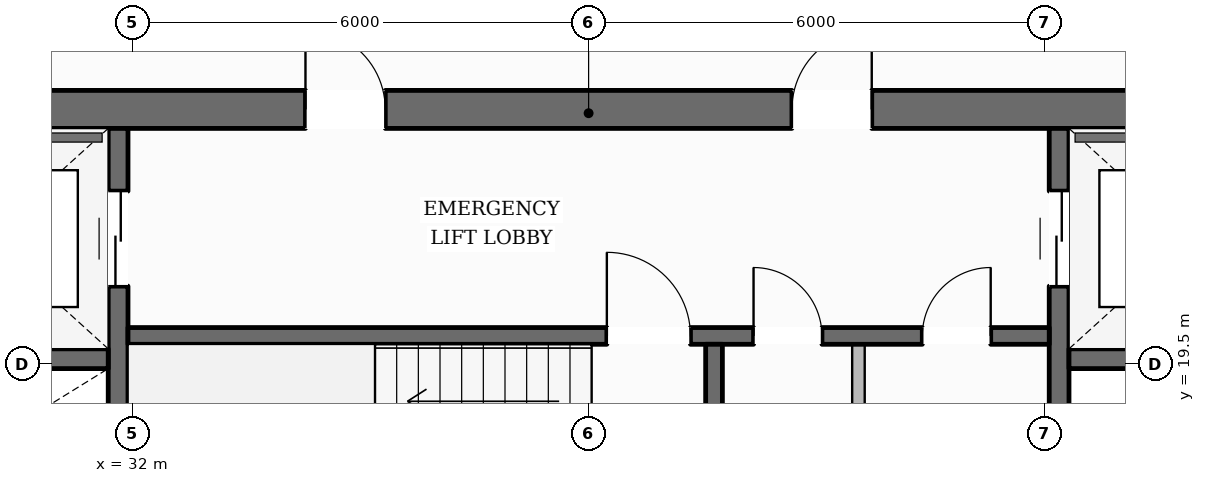
"""IFC4 building model, lengths in metres.
Left out: names, types, materials, properties, quantities, classifications, styles, units other than length and angle.
Written with IfcOpenShell. Run it as: python <this file> out.ifc"""

import sys

from ifc_helpers import new_model, si_unit, direction, frame, frame_2d, origin, place, context, subcontext, project, spatial, rectangle, extrude, element, fill, save


model = new_model("IFC4")
c1 = context("Model", 3, precision=1e-05, world=origin(), true_north=direction((0.0, 1.0)))
c2 = subcontext(c1, "Body", "Model", "MODEL_VIEW")
j1 = project(units=[si_unit("LENGTHUNIT", "METRE"), si_unit("PLANEANGLEUNIT", "RADIAN")], contexts=[c1])
p1 = place(None, origin())
s1 = spatial("IfcSite", under=j1, at=p1, CompositionType="ELEMENT")
p2 = place(p1, origin())
s2 = spatial("IfcBuilding", under=s1, at=p2, CompositionType="ELEMENT")
p3 = place(p2, frame((0.0, 0.0, 139.4)))
s3 = spatial("IfcBuildingStorey", under=s2, at=p3, CompositionType="ELEMENT", Elevation=139.4)
p4 = place(p3, frame((27.98, 22.85, 0.0), z_axis=(0.0, 0.0, 1.0), x_axis=(1.0, 0.0, 0.0)))
e1 = element("IfcWall", 1, at=p4, inside=s3, PredefinedType="SOLIDWALL", context=c2, shape_type="SweptSolid", body=[
    extrude(rectangle(XDim=20.04, YDim=0.5, at=frame_2d((10.02, 0.0))), origin(), (0.0, 0.0, 1.0), 3.6),
])
p5 = place(p4, frame((6.295, 0.0, 0.0)))
e2 = element("IfcOpeningElement", 2, at=p5, cuts=e1, PredefinedType="OPENING", context=c2, shape_type="SweptSolid", body=[
    extrude(rectangle(XDim=1.05, YDim=2.15, at=frame_2d((0.525, 1.075))), frame((0.0, 0.26, 0.0), z_axis=(0.0, -1.0, 0.0), x_axis=(1.0, 0.0, 0.0)), (0.0, 0.0, 1.0), 0.52),
])
p6 = place(p4, frame((12.695, 0.0, 0.0)))
e3 = element("IfcOpeningElement", 3, at=p6, cuts=e1, PredefinedType="OPENING", context=c2, shape_type="SweptSolid", body=[
    extrude(rectangle(XDim=1.05, YDim=2.15, at=frame_2d((0.525, 1.075))), frame((0.0, 0.26, 0.0), z_axis=(0.0, -1.0, 0.0), x_axis=(1.0, 0.0, 0.0)), (0.0, 0.0, 1.0), 0.52),
])
p7 = place(p3, frame((31.81, 9.6, 0.0), z_axis=(0.0, 0.0, 1.0), x_axis=(0.0, 1.0, 0.0)))
e4 = element("IfcWall", 4, at=p7, inside=s3, PredefinedType="SHEAR", context=c2, shape_type="SweptSolid", body=[
    extrude(rectangle(XDim=13.0, YDim=0.26, at=frame_2d((6.5, 0.0))), origin(), (0.0, 0.0, 1.0), 3.6),
])
p8 = place(p7, frame((10.925, 0.0, 0.0)))
e5 = element("IfcOpeningElement", 5, at=p8, cuts=e4, PredefinedType="OPENING", context=c2, shape_type="SweptSolid", body=[
    extrude(rectangle(XDim=1.25, YDim=2.25, at=frame_2d((0.625, 1.125))), frame((0.0, 0.14, 0.0), z_axis=(0.0, -1.0, 0.0), x_axis=(1.0, 0.0, 0.0)), (0.0, 0.0, 1.0), 0.28),
])
p9 = place(p3, frame((44.19, 9.6, 0.0), z_axis=(0.0, 0.0, 1.0), x_axis=(0.0, 1.0, 0.0)))
e6 = element("IfcWall", 6, at=p9, inside=s3, PredefinedType="SHEAR", context=c2, shape_type="SweptSolid", body=[
    extrude(rectangle(XDim=13.0, YDim=0.26, at=frame_2d((6.5, 0.0))), origin(), (0.0, 0.0, 1.0), 3.6),
])
p10 = place(p9, frame((10.925, 0.0, 0.0)))
e7 = element("IfcOpeningElement", 7, at=p10, cuts=e6, PredefinedType="OPENING", context=c2, shape_type="SweptSolid", body=[
    extrude(rectangle(XDim=1.25, YDim=2.25, at=frame_2d((0.625, 1.125))), frame((0.0, 0.14, 0.0), z_axis=(0.0, -1.0, 0.0), x_axis=(1.0, 0.0, 0.0)), (0.0, 0.0, 1.0), 0.28),
])
for number, where, z_axis, x_axis in (
    (8, (28.48, 19.57, 0.0), (0.0, 0.0, 1.0), (1.0, 0.0, 0.0)),
    (9, (44.32, 19.57, 0.0), (0.0, 0.0, 1.0), (1.0, 0.0, 0.0)),
):
    element("IfcWall", number, at=place(p3, frame(where, z_axis=z_axis, x_axis=x_axis)), inside=s3, PredefinedType="SHEAR", context=c2, shape_type="SweptSolid", body=[
        extrude(rectangle(XDim=3.2, YDim=0.26, at=frame_2d((1.6, 0.0))), origin(), (0.0, 0.0, 1.0), 3.6),
    ])
p11 = place(p3, frame((31.94, 19.87, 0.0), z_axis=(0.0, 0.0, 1.0), x_axis=(1.0, 0.0, 0.0)))
e10 = element("IfcWall", 10, at=p11, inside=s3, PredefinedType="SOLIDWALL", context=c2, shape_type="SweptSolid", body=[
    extrude(rectangle(XDim=12.12, YDim=0.22, at=frame_2d((6.06, 0.0))), origin(), (0.0, 0.0, 1.0), 3.6),
])
p12 = place(p11, frame((6.3, 0.0, 0.0)))
e11 = element("IfcOpeningElement", 11, at=p12, cuts=e10, PredefinedType="OPENING", context=c2, shape_type="SweptSolid", body=[
    extrude(rectangle(XDim=1.1, YDim=2.15, at=frame_2d((0.55, 1.075))), frame((0.0, 0.12, 0.0), z_axis=(0.0, -1.0, 0.0), x_axis=(1.0, 0.0, 0.0)), (0.0, 0.0, 1.0), 0.24),
])
p13 = place(p11, frame((8.23, 0.0, 0.0)))
e12 = element("IfcOpeningElement", 12, at=p13, cuts=e10, PredefinedType="OPENING", context=c2, shape_type="SweptSolid", body=[
    extrude(rectangle(XDim=0.9, YDim=2.1, at=frame_2d((0.45, 1.05))), frame((0.0, 0.12, 0.0), z_axis=(0.0, -1.0, 0.0), x_axis=(1.0, 0.0, 0.0)), (0.0, 0.0, 1.0), 0.24),
])
p14 = place(p11, frame((10.45, 0.0, 0.0)))
e13 = element("IfcOpeningElement", 13, at=p14, cuts=e10, PredefinedType="OPENING", context=c2, shape_type="SweptSolid", body=[
    extrude(rectangle(XDim=0.9, YDim=2.1, at=frame_2d((0.45, 1.05))), frame((0.0, 0.12, 0.0), z_axis=(0.0, -1.0, 0.0), x_axis=(1.0, 0.0, 0.0)), (0.0, 0.0, 1.0), 0.24),
])
p15 = place(p3, frame((39.65, 16.56, 0.0), z_axis=(0.0, 0.0, 1.0), x_axis=(0.0, 1.0, 0.0)))
e14 = element("IfcWall", 14, at=p15, inside=s3, PredefinedType="SOLIDWALL", context=c2, shape_type="SweptSolid", body=[
    extrude(rectangle(XDim=3.2, YDim=0.22, at=frame_2d((1.6, 0.0))), origin(), (0.0, 0.0, 1.0), 3.6),
])
p16 = place(p3, frame((13.257, 11.982, 0.0), z_axis=(0.0, 0.0, 1.0), x_axis=(0.506593608381, 0.862184966204, 0.0)))
e15 = element("IfcWall", 15, at=p16, inside=s3, PredefinedType="STANDARD", context=c2, shape_type="SweptSolid", body=[
    extrude(rectangle(XDim=37.828, YDim=0.38, at=frame_2d((18.914, 0.0))), origin(), (0.0, 0.0, 1.0), 3.059),
])
p17 = place(p16, frame((33.507, 0.0, 0.65)))
e16 = element("IfcOpeningElement", 16, at=p17, cuts=e15, PredefinedType="OPENING", context=c2, shape_type="SweptSolid", body=[
    extrude(rectangle(XDim=1.55, YDim=1.75, at=frame_2d((0.775, 0.875))), frame((0.0, 0.2, 0.0), z_axis=(0.0, -1.0, 0.0), x_axis=(1.0, 0.0, 0.0)), (0.0, 0.0, 1.0), 0.4),
])
p18 = place(p16, frame((27.362, 0.0, 0.65)))
e17 = element("IfcOpeningElement", 17, at=p18, cuts=e15, PredefinedType="OPENING", context=c2, shape_type="SweptSolid", body=[
    extrude(rectangle(XDim=1.55, YDim=1.75, at=frame_2d((0.775, 0.875))), frame((0.0, 0.2, 0.0), z_axis=(0.0, -1.0, 0.0), x_axis=(1.0, 0.0, 0.0)), (0.0, 0.0, 1.0), 0.4),
])
p19 = place(p16, frame((15.07, 0.0, 0.65)))
e18 = element("IfcOpeningElement", 18, at=p19, cuts=e15, PredefinedType="OPENING", context=c2, shape_type="SweptSolid", body=[
    extrude(rectangle(XDim=1.55, YDim=1.75, at=frame_2d((0.775, 0.875))), frame((0.0, 0.2, 0.0), z_axis=(0.0, -1.0, 0.0), x_axis=(1.0, 0.0, 0.0)), (0.0, 0.0, 1.0), 0.4),
])
p20 = place(p16, frame((8.924, 0.0, 0.65)))
e19 = element("IfcOpeningElement", 19, at=p20, cuts=e15, PredefinedType="OPENING", context=c2, shape_type="SweptSolid", body=[
    extrude(rectangle(XDim=1.55, YDim=1.75, at=frame_2d((0.775, 0.875))), frame((0.0, 0.2, 0.0), z_axis=(0.0, -1.0, 0.0), x_axis=(1.0, 0.0, 0.0)), (0.0, 0.0, 1.0), 0.4),
])
p21 = place(p16, frame((2.778, 0.0, 0.65)))
e20 = element("IfcOpeningElement", 20, at=p21, cuts=e15, PredefinedType="OPENING", context=c2, shape_type="SweptSolid", body=[
    extrude(rectangle(XDim=1.55, YDim=1.75, at=frame_2d((0.775, 0.875))), frame((0.0, 0.2, 0.0), z_axis=(0.0, -1.0, 0.0), x_axis=(1.0, 0.0, 0.0)), (0.0, 0.0, 1.0), 0.4),
])
p22 = place(p3, frame((43.468, 44.663, 0.0), z_axis=(0.0, 0.0, 1.0), x_axis=(0.501788207044, -0.864990517446, 0.0)))
e21 = element("IfcWall", 21, at=p22, inside=s3, PredefinedType="STANDARD", context=c2, shape_type="SweptSolid", body=[
    extrude(rectangle(XDim=37.465, YDim=0.38, at=frame_2d((18.732, 0.0))), origin(), (0.0, 0.0, 1.0), 3.059),
])
p23 = place(p22, frame((33.167, 0.0, 0.65)))
e22 = element("IfcOpeningElement", 22, at=p23, cuts=e21, PredefinedType="OPENING", context=c2, shape_type="SweptSolid", body=[
    extrude(rectangle(XDim=1.55, YDim=1.75, at=frame_2d((0.775, 0.875))), frame((0.0, 0.2, 0.0), z_axis=(0.0, -1.0, 0.0), x_axis=(1.0, 0.0, 0.0)), (0.0, 0.0, 1.0), 0.4),
])
p24 = place(p22, frame((27.083, 0.0, 0.65)))
e23 = element("IfcOpeningElement", 23, at=p24, cuts=e21, PredefinedType="OPENING", context=c2, shape_type="SweptSolid", body=[
    extrude(rectangle(XDim=1.55, YDim=1.75, at=frame_2d((0.775, 0.875))), frame((0.0, 0.2, 0.0), z_axis=(0.0, -1.0, 0.0), x_axis=(1.0, 0.0, 0.0)), (0.0, 0.0, 1.0), 0.4),
])
p25 = place(p22, frame((14.914, 0.0, 0.65)))
e24 = element("IfcOpeningElement", 24, at=p25, cuts=e21, PredefinedType="OPENING", context=c2, shape_type="SweptSolid", body=[
    extrude(rectangle(XDim=1.55, YDim=1.75, at=frame_2d((0.775, 0.875))), frame((0.0, 0.2, 0.0), z_axis=(0.0, -1.0, 0.0), x_axis=(1.0, 0.0, 0.0)), (0.0, 0.0, 1.0), 0.4),
])
p26 = place(p22, frame((8.83, 0.0, 0.65)))
e25 = element("IfcOpeningElement", 25, at=p26, cuts=e21, PredefinedType="OPENING", context=c2, shape_type="SweptSolid", body=[
    extrude(rectangle(XDim=1.55, YDim=1.75, at=frame_2d((0.775, 0.875))), frame((0.0, 0.2, 0.0), z_axis=(0.0, -1.0, 0.0), x_axis=(1.0, 0.0, 0.0)), (0.0, 0.0, 1.0), 0.4),
])
p27 = place(p22, frame((2.745, 0.0, 0.65)))
e26 = element("IfcOpeningElement", 26, at=p27, cuts=e21, PredefinedType="OPENING", context=c2, shape_type="SweptSolid", body=[
    extrude(rectangle(XDim=1.55, YDim=1.75, at=frame_2d((0.775, 0.875))), frame((0.0, 0.2, 0.0), z_axis=(0.0, -1.0, 0.0), x_axis=(1.0, 0.0, 0.0)), (0.0, 0.0, 1.0), 0.4),
])
p28 = place(p3, frame((41.55, 16.56, 0.0), z_axis=(0.0, 0.0, 1.0), x_axis=(0.0, 1.0, 0.0)))
e27 = element("IfcWall", 27, at=p28, inside=s3, PredefinedType="PARTITIONING", context=c2, shape_type="SweptSolid", body=[
    extrude(rectangle(XDim=3.2, YDim=0.165, at=frame_2d((1.6, 0.0))), origin(), (0.0, 0.0, 1.0), 3.6),
])
p29 = place(p12, origin())
e28 = element("IfcDoor", 28, at=p29, inside=s3, OperationType="SINGLE_SWING_LEFT", PredefinedType="DOOR", context=c2, shape_type="SweptSolid", body=[
    extrude(rectangle(XDim=1.1, YDim=2.15, at=frame_2d((0.55, 1.075))), frame((0.0, 0.025, 0.0), z_axis=(0.0, -1.0, 0.0), x_axis=(1.0, 0.0, 0.0)), (0.0, 0.0, 1.0), 0.05),
])
fill(e11, e28)
p30 = place(p5, origin())
e29 = element("IfcDoor", 29, at=p30, inside=s3, OperationType="SINGLE_SWING_LEFT", PredefinedType="DOOR", context=c2, shape_type="SweptSolid", body=[
    extrude(rectangle(XDim=1.05, YDim=2.15, at=frame_2d((0.525, 1.075))), frame((0.0, 0.025, 0.0), z_axis=(0.0, -1.0, 0.0), x_axis=(1.0, 0.0, 0.0)), (0.0, 0.0, 1.0), 0.05),
])
fill(e2, e29)
p31 = place(p6, origin())
e30 = element("IfcDoor", 30, at=p31, inside=s3, OperationType="SINGLE_SWING_RIGHT", PredefinedType="DOOR", context=c2, shape_type="SweptSolid", body=[
    extrude(rectangle(XDim=1.05, YDim=2.15, at=frame_2d((0.525, 1.075))), frame((0.0, 0.025, 0.0), z_axis=(0.0, -1.0, 0.0), x_axis=(1.0, 0.0, 0.0)), (0.0, 0.0, 1.0), 0.05),
])
fill(e3, e30)
p32 = place(p8, origin())
e31 = element("IfcDoor", 31, at=p32, inside=s3, OperationType="DOUBLE_DOOR_SLIDING", PredefinedType="DOOR", context=c2, shape_type="SweptSolid", body=[
    extrude(rectangle(XDim=1.25, YDim=2.25, at=frame_2d((0.625, 1.125))), frame((0.0, 0.025, 0.0), z_axis=(0.0, -1.0, 0.0), x_axis=(1.0, 0.0, 0.0)), (0.0, 0.0, 1.0), 0.05),
])
fill(e5, e31)
p33 = place(p10, origin())
e32 = element("IfcDoor", 32, at=p33, inside=s3, OperationType="DOUBLE_DOOR_SLIDING", PredefinedType="DOOR", context=c2, shape_type="SweptSolid", body=[
    extrude(rectangle(XDim=1.25, YDim=2.25, at=frame_2d((0.625, 1.125))), frame((0.0, 0.025, 0.0), z_axis=(0.0, -1.0, 0.0), x_axis=(1.0, 0.0, 0.0)), (0.0, 0.0, 1.0), 0.05),
])
fill(e7, e32)
p34 = place(p13, origin())
e33 = element("IfcDoor", 33, at=p34, inside=s3, OperationType="SINGLE_SWING_LEFT", PredefinedType="DOOR", context=c2, shape_type="SweptSolid", body=[
    extrude(rectangle(XDim=0.9, YDim=2.1, at=frame_2d((0.45, 1.05))), frame((0.0, 0.025, 0.0), z_axis=(0.0, -1.0, 0.0), x_axis=(1.0, 0.0, 0.0)), (0.0, 0.0, 1.0), 0.05),
])
fill(e12, e33)
p35 = place(p14, origin())
e34 = element("IfcDoor", 34, at=p35, inside=s3, OperationType="SINGLE_SWING_RIGHT", PredefinedType="DOOR", context=c2, shape_type="SweptSolid", body=[
    extrude(rectangle(XDim=0.9, YDim=2.1, at=frame_2d((0.45, 1.05))), frame((0.0, 0.025, 0.0), z_axis=(0.0, -1.0, 0.0), x_axis=(1.0, 0.0, 0.0)), (0.0, 0.0, 1.0), 0.05),
])
fill(e13, e34)
save(model, sys.argv[1])
